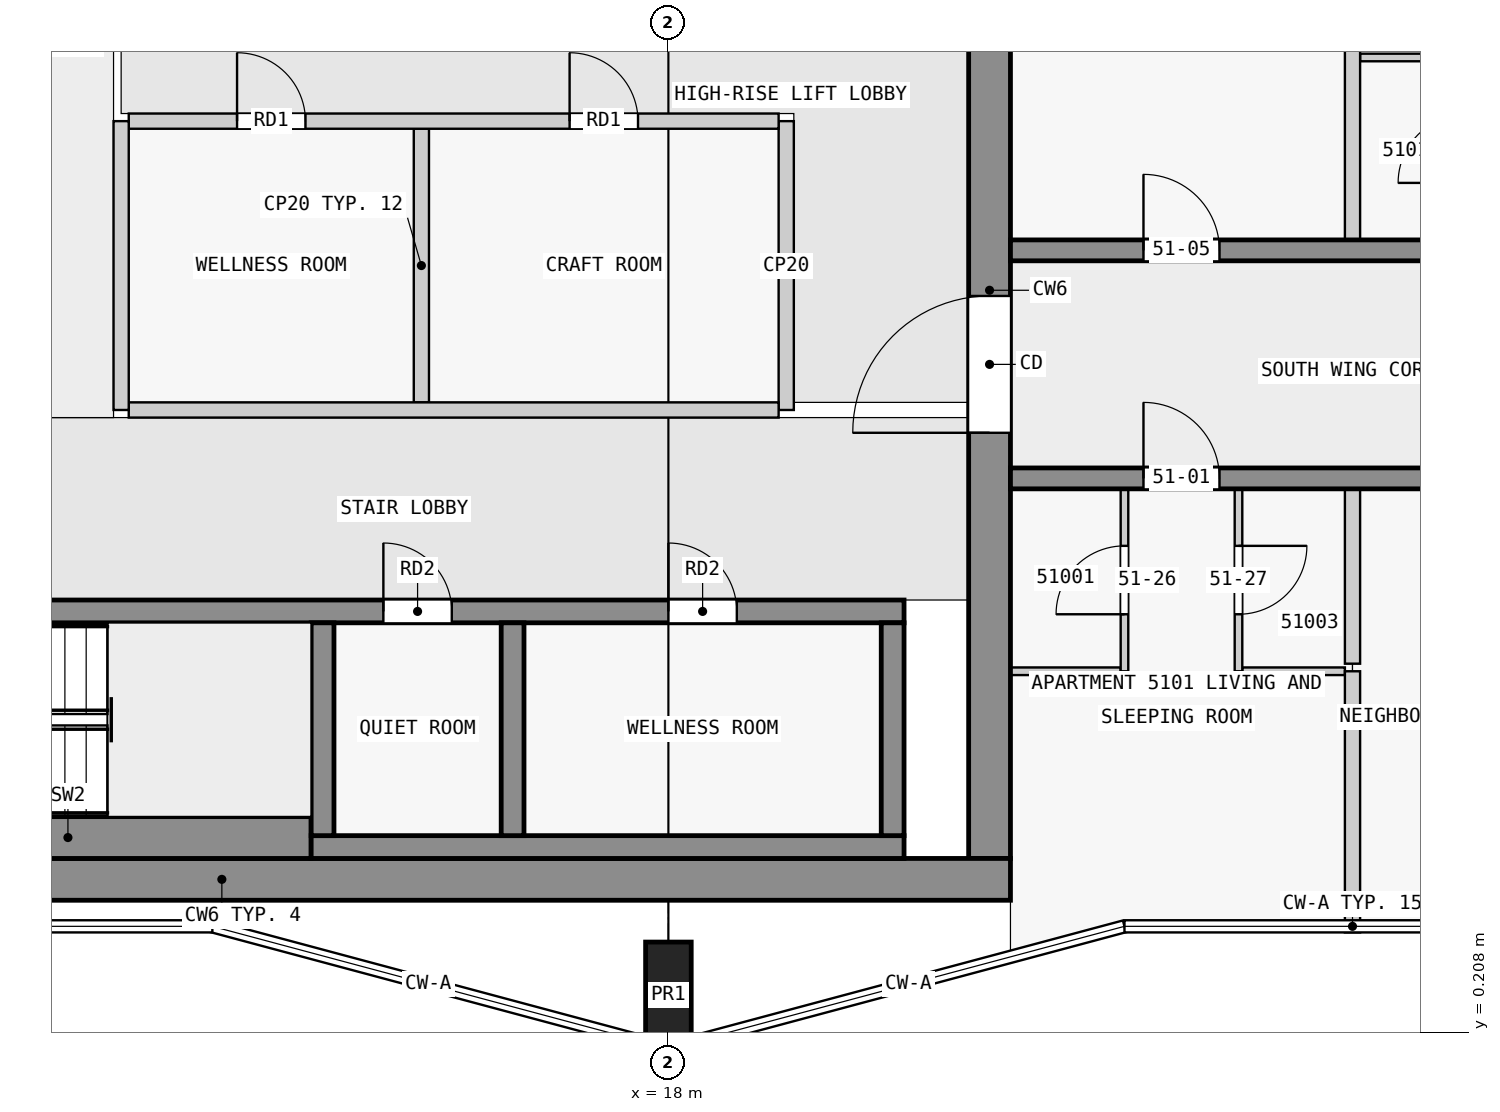
"""IFC4 building model, lengths in metres.
Left out: names, types, materials, properties, quantities, classifications, styles, units other than length and angle.
Written with IfcOpenShell. Run it as: python <this file> out.ifc"""

import sys

from ifc_helpers import new_model, si_unit, direction, frame, frame_2d, origin, origin_2d, place, context, subcontext, project, spatial, rectangle, extrude, element, fill, save


model = new_model("IFC4")
c1 = context("Model", 3, precision=1e-05, world=origin(), true_north=direction((0.0, 1.0)))
c2 = subcontext(c1, "Body", "Model", "MODEL_VIEW")
j1 = project(units=[si_unit("LENGTHUNIT", "METRE"), si_unit("PLANEANGLEUNIT", "RADIAN")], contexts=[c1])
p1 = place(None, origin())
s1 = spatial("IfcSite", under=j1, at=p1, CompositionType="ELEMENT")
p2 = place(p1, origin())
s2 = spatial("IfcBuilding", under=s1, at=p2, CompositionType="ELEMENT")
p3 = place(p2, frame((0.0, 0.0, 197.9)))
s3 = spatial("IfcBuildingStorey", under=s2, at=p3, CompositionType="ELEMENT", Elevation=197.9)
p4 = place(p3, frame((18.0, 0.7, 0.0), z_axis=(0.0, 0.0, 1.0), x_axis=(1.0, 0.0, 0.0)))
e1 = element("IfcColumn", 1, at=p4, inside=s3, PredefinedType="COLUMN", context=c2, shape_type="SweptSolid", body=[
    extrude(rectangle(XDim=0.6, YDim=1.4, at=origin_2d()), origin(), (0.0, 0.0, 1.0), 3.5),
])
p5 = place(p3, frame((1.75, 2.225, 0.0), z_axis=(0.0, 0.0, 1.0), x_axis=(1.0, 0.0, 0.0)))
e2 = element("IfcWall", 2, at=p5, inside=s3, PredefinedType="SHEAR", context=c2, shape_type="SweptSolid", body=[
    extrude(rectangle(XDim=20.75, YDim=0.55, at=frame_2d((10.375, 0.0))), origin(), (0.0, 0.0, 1.0), 3.25),
])
p6 = place(p3, frame((22.225, 2.5, 0.0), z_axis=(0.0, 0.0, 1.0), x_axis=(0.0, 1.0, 0.0)))
e3 = element("IfcWall", 3, at=p6, inside=s3, PredefinedType="SHEAR", context=c2, shape_type="SweptSolid", body=[
    extrude(rectangle(XDim=14.95, YDim=0.55, at=frame_2d((7.475, 0.0))), origin(), (0.0, 0.0, 1.0), 3.25),
])
p7 = place(p6, frame((5.6, 0.0, 0.0)))
e4 = element("IfcOpeningElement", 4, at=p7, cuts=e3, PredefinedType="OPENING", context=c2, shape_type="SweptSolid", body=[
    extrude(rectangle(XDim=1.8, YDim=2.1, at=frame_2d((0.9, 1.05))), frame((0.0, 0.285, 0.0), z_axis=(0.0, -1.0, 0.0), x_axis=(1.0, 0.0, 0.0)), (0.0, 0.0, 1.0), 0.57),
])
p8 = place(p3, frame((6.9, 2.775, 0.0), z_axis=(0.0, 0.0, 1.0), x_axis=(1.0, 0.0, 0.0)))
e5 = element("IfcWall", 5, at=p8, inside=s3, PredefinedType="SHEAR", context=c2, shape_type="SweptSolid", body=[
    extrude(rectangle(XDim=6.4, YDim=0.55, at=frame_2d((3.2, 0.0))), origin(), (0.0, 0.0, 1.0), 3.25),
])
p9 = place(p3, frame((13.3, 2.65, 0.0), z_axis=(0.0, 0.0, 1.0), x_axis=(1.0, 0.0, 0.0)))
e6 = element("IfcWall", 6, at=p9, inside=s3, PredefinedType="SHEAR", context=c2, shape_type="SweptSolid", body=[
    extrude(rectangle(XDim=7.8, YDim=0.3, at=frame_2d((3.9, 0.0))), origin(), (0.0, 0.0, 1.0), 3.25),
])
for number, where, z_axis, x_axis in (
    (7, (13.45, 2.8, 0.0), (0.0, 0.0, 1.0), (0.0, 1.0, 0.0)),
    (8, (15.95, 2.8, 0.0), (0.0, 0.0, 1.0), (0.0, 1.0, 0.0)),
    (9, (20.95, 2.8, 0.0), (0.0, 0.0, 1.0), (0.0, 1.0, 0.0)),
):
    element("IfcWall", number, at=place(p3, frame(where, z_axis=z_axis, x_axis=x_axis)), inside=s3, PredefinedType="SHEAR", context=c2, shape_type="SweptSolid", body=[
        extrude(rectangle(XDim=2.8, YDim=0.3, at=frame_2d((1.4, 0.0))), origin(), (0.0, 0.0, 1.0), 3.25),
    ])
p10 = place(p3, frame((2.3, 5.75, 0.0), z_axis=(0.0, 0.0, 1.0), x_axis=(1.0, 0.0, 0.0)))
e10 = element("IfcWall", 10, at=p10, inside=s3, PredefinedType="SHEAR", context=c2, shape_type="SweptSolid", body=[
    extrude(rectangle(XDim=18.8, YDim=0.3, at=frame_2d((9.4, 0.0))), origin(), (0.0, 0.0, 1.0), 3.25),
])
p11 = place(p10, frame((4.65, 0.0, 0.0)))
e11 = element("IfcOpeningElement", 11, at=p11, cuts=e10, PredefinedType="OPENING", context=c2, shape_type="SweptSolid", body=[
    extrude(rectangle(XDim=1.1, YDim=2.1, at=frame_2d((0.55, 1.05))), frame((0.0, 0.16, 0.0), z_axis=(0.0, -1.0, 0.0), x_axis=(1.0, 0.0, 0.0)), (0.0, 0.0, 1.0), 0.32),
])
p12 = place(p10, frame((0.45, 0.0, 0.0)))
e12 = element("IfcOpeningElement", 12, at=p12, cuts=e10, PredefinedType="OPENING", context=c2, shape_type="SweptSolid", body=[
    extrude(rectangle(XDim=1.1, YDim=2.1, at=frame_2d((0.55, 1.05))), frame((0.0, 0.16, 0.0), z_axis=(0.0, -1.0, 0.0), x_axis=(1.0, 0.0, 0.0)), (0.0, 0.0, 1.0), 0.32),
])
p13 = place(p10, frame((2.75, 0.0, 0.0)))
e13 = element("IfcOpeningElement", 13, at=p13, cuts=e10, PredefinedType="OPENING", context=c2, shape_type="SweptSolid", body=[
    extrude(rectangle(XDim=1.1, YDim=2.1, at=frame_2d((0.55, 1.05))), frame((0.0, 0.16, 0.0), z_axis=(0.0, -1.0, 0.0), x_axis=(1.0, 0.0, 0.0)), (0.0, 0.0, 1.0), 0.32),
])
p14 = place(p10, frame((11.95, 0.0, 0.0)))
e14 = element("IfcOpeningElement", 14, at=p14, cuts=e10, PredefinedType="OPENING", context=c2, shape_type="SweptSolid", body=[
    extrude(rectangle(XDim=0.9, YDim=2.1, at=frame_2d((0.45, 1.05))), frame((0.0, 0.16, 0.0), z_axis=(0.0, -1.0, 0.0), x_axis=(1.0, 0.0, 0.0)), (0.0, 0.0, 1.0), 0.32),
])
p15 = place(p10, frame((15.7, 0.0, 0.0)))
e15 = element("IfcOpeningElement", 15, at=p15, cuts=e10, PredefinedType="OPENING", context=c2, shape_type="SweptSolid", body=[
    extrude(rectangle(XDim=0.9, YDim=2.1, at=frame_2d((0.45, 1.05))), frame((0.0, 0.16, 0.0), z_axis=(0.0, -1.0, 0.0), x_axis=(1.0, 0.0, 0.0)), (0.0, 0.0, 1.0), 0.32),
])
p16 = place(p3, frame((22.5, 7.5, 0.0), z_axis=(0.0, 0.0, 1.0), x_axis=(1.0, 0.0, 0.0)))
e16 = element("IfcWall", 16, at=p16, inside=s3, PredefinedType="SHEAR", context=c2, shape_type="SweptSolid", body=[
    extrude(rectangle(XDim=22.5, YDim=0.275, at=frame_2d((11.25, 0.0))), origin(), (0.0, 0.0, 1.0), 3.25),
])
p17 = place(p16, frame((1.75, 0.0, 0.0)))
e17 = element("IfcOpeningElement", 17, at=p17, cuts=e16, PredefinedType="OPENING", context=c2, shape_type="SweptSolid", body=[
    extrude(rectangle(XDim=1.0, YDim=2.1, at=frame_2d((0.5, 1.05))), frame((0.0, 0.147, 0.0), z_axis=(0.0, -1.0, 0.0), x_axis=(1.0, 0.0, 0.0)), (0.0, 0.0, 1.0), 0.295),
])
p18 = place(p16, frame((5.85, 0.0, 0.0)))
e18 = element("IfcOpeningElement", 18, at=p18, cuts=e16, PredefinedType="OPENING", context=c2, shape_type="SweptSolid", body=[
    extrude(rectangle(XDim=1.8, YDim=2.1, at=frame_2d((0.9, 1.05))), frame((0.0, 0.147, 0.0), z_axis=(0.0, -1.0, 0.0), x_axis=(1.0, 0.0, 0.0)), (0.0, 0.0, 1.0), 0.295),
])
p19 = place(p16, frame((10.75, 0.0, 0.0)))
e19 = element("IfcOpeningElement", 19, at=p19, cuts=e16, PredefinedType="OPENING", context=c2, shape_type="SweptSolid", body=[
    extrude(rectangle(XDim=1.0, YDim=2.1, at=frame_2d((0.5, 1.05))), frame((0.0, 0.147, 0.0), z_axis=(0.0, -1.0, 0.0), x_axis=(1.0, 0.0, 0.0)), (0.0, 0.0, 1.0), 0.295),
])
p20 = place(p16, frame((16.85, 0.0, 0.0)))
e20 = element("IfcOpeningElement", 20, at=p20, cuts=e16, PredefinedType="OPENING", context=c2, shape_type="SweptSolid", body=[
    extrude(rectangle(XDim=1.0, YDim=2.1, at=frame_2d((0.5, 1.05))), frame((0.0, 0.147, 0.0), z_axis=(0.0, -1.0, 0.0), x_axis=(1.0, 0.0, 0.0)), (0.0, 0.0, 1.0), 0.295),
])
p21 = place(p3, frame((22.5, 10.5, 0.0), z_axis=(0.0, 0.0, 1.0), x_axis=(1.0, 0.0, 0.0)))
e21 = element("IfcWall", 21, at=p21, inside=s3, PredefinedType="SHEAR", context=c2, shape_type="SweptSolid", body=[
    extrude(rectangle(XDim=22.5, YDim=0.275, at=frame_2d((11.25, 0.0))), origin(), (0.0, 0.0, 1.0), 3.25),
])
p22 = place(p21, frame((1.75, 0.0, 0.0)))
e22 = element("IfcOpeningElement", 22, at=p22, cuts=e21, PredefinedType="OPENING", context=c2, shape_type="SweptSolid", body=[
    extrude(rectangle(XDim=1.0, YDim=2.1, at=frame_2d((0.5, 1.05))), frame((0.0, 0.147, 0.0), z_axis=(0.0, -1.0, 0.0), x_axis=(1.0, 0.0, 0.0)), (0.0, 0.0, 1.0), 0.295),
])
p23 = place(p21, frame((6.25, 0.0, 0.0)))
e23 = element("IfcOpeningElement", 23, at=p23, cuts=e21, PredefinedType="OPENING", context=c2, shape_type="SweptSolid", body=[
    extrude(rectangle(XDim=1.0, YDim=2.1, at=frame_2d((0.5, 1.05))), frame((0.0, 0.147, 0.0), z_axis=(0.0, -1.0, 0.0), x_axis=(1.0, 0.0, 0.0)), (0.0, 0.0, 1.0), 0.295),
])
p24 = place(p21, frame((10.75, 0.0, 0.0)))
e24 = element("IfcOpeningElement", 24, at=p24, cuts=e21, PredefinedType="OPENING", context=c2, shape_type="SweptSolid", body=[
    extrude(rectangle(XDim=1.0, YDim=2.1, at=frame_2d((0.5, 1.05))), frame((0.0, 0.147, 0.0), z_axis=(0.0, -1.0, 0.0), x_axis=(1.0, 0.0, 0.0)), (0.0, 0.0, 1.0), 0.295),
])
p25 = place(p21, frame((15.25, 0.0, 0.0)))
e25 = element("IfcOpeningElement", 25, at=p25, cuts=e21, PredefinedType="OPENING", context=c2, shape_type="SweptSolid", body=[
    extrude(rectangle(XDim=1.0, YDim=2.1, at=frame_2d((0.5, 1.05))), frame((0.0, 0.147, 0.0), z_axis=(0.0, -1.0, 0.0), x_axis=(1.0, 0.0, 0.0)), (0.0, 0.0, 1.0), 0.295),
])
p26 = place(p21, frame((18.75, 0.0, 0.0)))
e26 = element("IfcOpeningElement", 26, at=p26, cuts=e21, PredefinedType="OPENING", context=c2, shape_type="SweptSolid", body=[
    extrude(rectangle(XDim=0.9, YDim=2.1, at=frame_2d((0.45, 1.05))), frame((0.0, 0.147, 0.0), z_axis=(0.0, -1.0, 0.0), x_axis=(1.0, 0.0, 0.0)), (0.0, 0.0, 1.0), 0.295),
])
p27 = place(p21, frame((20.95, 0.0, 0.0)))
e27 = element("IfcOpeningElement", 27, at=p27, cuts=e21, PredefinedType="OPENING", context=c2, shape_type="SweptSolid", body=[
    extrude(rectangle(XDim=1.0, YDim=2.1, at=frame_2d((0.5, 1.05))), frame((0.0, 0.147, 0.0), z_axis=(0.0, -1.0, 0.0), x_axis=(1.0, 0.0, 0.0)), (0.0, 0.0, 1.0), 0.295),
])
p28 = place(p3, frame((10.8, 8.4, 0.0), z_axis=(0.0, 0.0, 1.0), x_axis=(0.0, 1.0, 0.0)))
e28 = element("IfcWall", 28, at=p28, inside=s3, PredefinedType="PARTITIONING", context=c2, shape_type="SweptSolid", body=[
    extrude(rectangle(XDim=3.8, YDim=0.2, at=frame_2d((1.9, 0.0))), origin(), (0.0, 0.0, 1.0), 3.25),
])
p29 = place(p3, frame((10.9, 8.4, 0.0), z_axis=(0.0, 0.0, 1.0), x_axis=(1.0, 0.0, 0.0)))
e29 = element("IfcWall", 29, at=p29, inside=s3, PredefinedType="PARTITIONING", context=c2, shape_type="SweptSolid", body=[
    extrude(rectangle(XDim=8.55, YDim=0.2, at=frame_2d((4.275, 0.0))), origin(), (0.0, 0.0, 1.0), 3.25),
])
p30 = place(p3, frame((19.55, 8.4, 0.0), z_axis=(0.0, 0.0, 1.0), x_axis=(0.0, 1.0, 0.0)))
e30 = element("IfcWall", 30, at=p30, inside=s3, PredefinedType="PARTITIONING", context=c2, shape_type="SweptSolid", body=[
    extrude(rectangle(XDim=3.8, YDim=0.2, at=frame_2d((1.9, 0.0))), origin(), (0.0, 0.0, 1.0), 3.25),
])
p31 = place(p3, frame((10.9, 12.2, 0.0), z_axis=(0.0, 0.0, 1.0), x_axis=(1.0, 0.0, 0.0)))
e31 = element("IfcWall", 31, at=p31, inside=s3, PredefinedType="PARTITIONING", context=c2, shape_type="SweptSolid", body=[
    extrude(rectangle(XDim=8.55, YDim=0.2, at=frame_2d((4.275, 0.0))), origin(), (0.0, 0.0, 1.0), 3.25),
])
p32 = place(p31, frame((1.425, 0.0, 0.0)))
e32 = element("IfcOpeningElement", 32, at=p32, cuts=e31, PredefinedType="OPENING", context=c2, shape_type="SweptSolid", body=[
    extrude(rectangle(XDim=0.9, YDim=2.1, at=frame_2d((0.45, 1.05))), frame((0.0, 0.11, 0.0), z_axis=(0.0, -1.0, 0.0), x_axis=(1.0, 0.0, 0.0)), (0.0, 0.0, 1.0), 0.22),
])
p33 = place(p31, frame((5.8, 0.0, 0.0)))
e33 = element("IfcOpeningElement", 33, at=p33, cuts=e31, PredefinedType="OPENING", context=c2, shape_type="SweptSolid", body=[
    extrude(rectangle(XDim=0.9, YDim=2.1, at=frame_2d((0.45, 1.05))), frame((0.0, 0.11, 0.0), z_axis=(0.0, -1.0, 0.0), x_axis=(1.0, 0.0, 0.0)), (0.0, 0.0, 1.0), 0.22),
])
p34 = place(p3, frame((14.75, 8.5, 0.0), z_axis=(0.0, 0.0, 1.0), x_axis=(0.0, 1.0, 0.0)))
e34 = element("IfcWall", 34, at=p34, inside=s3, PredefinedType="PARTITIONING", context=c2, shape_type="SweptSolid", body=[
    extrude(rectangle(XDim=3.6, YDim=0.2, at=frame_2d((1.8, 0.0))), origin(), (0.0, 0.0, 1.0), 3.25),
])
p35 = place(p3, frame((22.5, 4.962, 0.0), z_axis=(0.0, 0.0, 1.0), x_axis=(1.0, 0.0, 0.0)))
e35 = element("IfcWall", 35, at=p35, inside=s3, PredefinedType="PARTITIONING", context=c2, shape_type="SweptSolid", body=[
    extrude(rectangle(XDim=1.45, YDim=0.1, at=frame_2d((0.725, 0.0))), origin(), (0.0, 0.0, 1.0), 3.25),
])
for number, where, z_axis, x_axis in (
    (36, (25.55, 4.962, 0.0), (0.0, 0.0, 1.0), (1.0, 0.0, 0.0)),
    (37, (28.45, 13.038, 0.0), (0.0, 0.0, 1.0), (-1.0, 0.0, 0.0)),
):
    element("IfcWall", number, at=place(p3, frame(where, z_axis=z_axis, x_axis=x_axis)), inside=s3, PredefinedType="PARTITIONING", context=c2, shape_type="SweptSolid", body=[
        extrude(rectangle(XDim=1.35, YDim=0.1, at=frame_2d((0.675, 0.0))), origin(), (0.0, 0.0, 1.0), 3.25),
    ])
p36 = place(p3, frame((24.0, 4.962, 0.0), z_axis=(0.0, 0.0, 1.0), x_axis=(0.0, 1.0, 0.0)))
e38 = element("IfcWall", 38, at=p36, inside=s3, PredefinedType="PARTITIONING", context=c2, shape_type="SweptSolid", body=[
    extrude(rectangle(XDim=2.4, YDim=0.1, at=frame_2d((1.2, 0.0))), origin(), (0.0, 0.0, 1.0), 3.25),
])
p37 = place(p36, frame((0.75, 0.0, 0.0)))
e39 = element("IfcOpeningElement", 39, at=p37, cuts=e38, PredefinedType="OPENING", context=c2, shape_type="SweptSolid", body=[
    extrude(rectangle(XDim=0.9, YDim=2.1, at=frame_2d((0.45, 1.05))), frame((0.0, 0.06, 0.0), z_axis=(0.0, -1.0, 0.0), x_axis=(1.0, 0.0, 0.0)), (0.0, 0.0, 1.0), 0.12),
])
p38 = place(p3, frame((25.5, 7.363, 0.0), z_axis=(0.0, 0.0, 1.0), x_axis=(0.0, -1.0, 0.0)))
e40 = element("IfcWall", 40, at=p38, inside=s3, PredefinedType="PARTITIONING", context=c2, shape_type="SweptSolid", body=[
    extrude(rectangle(XDim=2.4, YDim=0.1, at=frame_2d((1.2, 0.0))), origin(), (0.0, 0.0, 1.0), 3.25),
])
p39 = place(p38, frame((0.75, 0.0, 0.0)))
e41 = element("IfcOpeningElement", 41, at=p39, cuts=e40, PredefinedType="OPENING", context=c2, shape_type="SweptSolid", body=[
    extrude(rectangle(XDim=0.9, YDim=2.1, at=frame_2d((0.45, 1.05))), frame((0.0, 0.06, 0.0), z_axis=(0.0, -1.0, 0.0), x_axis=(1.0, 0.0, 0.0)), (0.0, 0.0, 1.0), 0.12),
])
p40 = place(p3, frame((27.0, 4.962, 0.0), z_axis=(0.0, 0.0, 1.0), x_axis=(0.0, -1.0, 0.0)))
e42 = element("IfcWall", 42, at=p40, inside=s3, PredefinedType="PARTITIONING", context=c2, shape_type="SweptSolid", body=[
    extrude(rectangle(XDim=3.436, YDim=0.2, at=frame_2d((1.718, 0.0))), origin(), (0.0, 0.0, 1.0), 3.25),
])
p41 = place(p3, frame((27.0, 5.062, 0.0), z_axis=(0.0, 0.0, 1.0), x_axis=(0.0, 1.0, 0.0)))
e43 = element("IfcWall", 43, at=p41, inside=s3, PredefinedType="PARTITIONING", context=c2, shape_type="SweptSolid", body=[
    extrude(rectangle(XDim=2.3, YDim=0.2, at=frame_2d((1.15, 0.0))), origin(), (0.0, 0.0, 1.0), 3.25),
])
p42 = place(p3, frame((27.0, 10.637, 0.0), z_axis=(0.0, 0.0, 1.0), x_axis=(0.0, 1.0, 0.0)))
e44 = element("IfcWall", 44, at=p42, inside=s3, PredefinedType="PARTITIONING", context=c2, shape_type="SweptSolid", body=[
    extrude(rectangle(XDim=5.836, YDim=0.2, at=frame_2d((2.918, 0.0))), origin(), (0.0, 0.0, 1.0), 3.25),
])
p43 = place(p32, origin())
e45 = element("IfcDoor", 45, at=p43, inside=s3, OperationType="SINGLE_SWING_LEFT", PredefinedType="DOOR", context=c2, shape_type="SweptSolid", body=[
    extrude(rectangle(XDim=0.9, YDim=2.1, at=frame_2d((0.45, 1.05))), frame((0.0, 0.025, 0.0), z_axis=(0.0, -1.0, 0.0), x_axis=(1.0, 0.0, 0.0)), (0.0, 0.0, 1.0), 0.05),
])
fill(e32, e45)
p44 = place(p33, origin())
e46 = element("IfcDoor", 46, at=p44, inside=s3, OperationType="SINGLE_SWING_LEFT", PredefinedType="DOOR", context=c2, shape_type="SweptSolid", body=[
    extrude(rectangle(XDim=0.9, YDim=2.1, at=frame_2d((0.45, 1.05))), frame((0.0, 0.025, 0.0), z_axis=(0.0, -1.0, 0.0), x_axis=(1.0, 0.0, 0.0)), (0.0, 0.0, 1.0), 0.05),
])
fill(e33, e46)
p45 = place(p7, origin())
e47 = element("IfcDoor", 47, at=p45, inside=s3, OperationType="DOUBLE_DOOR_SINGLE_SWING", PredefinedType="DOOR", context=c2, shape_type="SweptSolid", body=[
    extrude(rectangle(XDim=1.8, YDim=2.1, at=frame_2d((0.9, 1.05))), frame((0.0, 0.025, 0.0), z_axis=(0.0, -1.0, 0.0), x_axis=(1.0, 0.0, 0.0)), (0.0, 0.0, 1.0), 0.05),
])
fill(e4, e47)
p46 = place(p14, origin())
e48 = element("IfcDoor", 48, at=p46, inside=s3, OperationType="SINGLE_SWING_LEFT", PredefinedType="DOOR", context=c2, shape_type="SweptSolid", body=[
    extrude(rectangle(XDim=0.9, YDim=2.1, at=frame_2d((0.45, 1.05))), frame((0.0, 0.025, 0.0), z_axis=(0.0, -1.0, 0.0), x_axis=(1.0, 0.0, 0.0)), (0.0, 0.0, 1.0), 0.05),
])
fill(e14, e48)
p47 = place(p15, origin())
e49 = element("IfcDoor", 49, at=p47, inside=s3, OperationType="SINGLE_SWING_LEFT", PredefinedType="DOOR", context=c2, shape_type="SweptSolid", body=[
    extrude(rectangle(XDim=0.9, YDim=2.1, at=frame_2d((0.45, 1.05))), frame((0.0, 0.025, 0.0), z_axis=(0.0, -1.0, 0.0), x_axis=(1.0, 0.0, 0.0)), (0.0, 0.0, 1.0), 0.05),
])
fill(e15, e49)
p48 = place(p17, origin())
e50 = element("IfcDoor", 50, at=p48, inside=s3, OperationType="SINGLE_SWING_LEFT", PredefinedType="DOOR", context=c2, shape_type="SweptSolid", body=[
    extrude(rectangle(XDim=1.0, YDim=2.1, at=frame_2d((0.5, 1.05))), frame((0.0, 0.025, 0.0), z_axis=(0.0, -1.0, 0.0), x_axis=(1.0, 0.0, 0.0)), (0.0, 0.0, 1.0), 0.05),
])
fill(e17, e50)
p49 = place(p22, origin())
e51 = element("IfcDoor", 51, at=p49, inside=s3, OperationType="SINGLE_SWING_LEFT", PredefinedType="DOOR", context=c2, shape_type="SweptSolid", body=[
    extrude(rectangle(XDim=1.0, YDim=2.1, at=frame_2d((0.5, 1.05))), frame((0.0, 0.025, 0.0), z_axis=(0.0, -1.0, 0.0), x_axis=(1.0, 0.0, 0.0)), (0.0, 0.0, 1.0), 0.05),
])
fill(e22, e51)
p50 = place(p37, origin())
e52 = element("IfcDoor", 52, at=p50, inside=s3, OperationType="SINGLE_SWING_RIGHT", PredefinedType="DOOR", context=c2, shape_type="SweptSolid", body=[
    extrude(rectangle(XDim=0.9, YDim=2.1, at=frame_2d((0.45, 1.05))), frame((0.0, 0.025, 0.0), z_axis=(0.0, -1.0, 0.0), x_axis=(1.0, 0.0, 0.0)), (0.0, 0.0, 1.0), 0.05),
])
fill(e39, e52)
p51 = place(p39, origin())
e53 = element("IfcDoor", 53, at=p51, inside=s3, OperationType="SINGLE_SWING_RIGHT", PredefinedType="DOOR", context=c2, shape_type="SweptSolid", body=[
    extrude(rectangle(XDim=0.9, YDim=2.1, at=frame_2d((0.45, 1.05))), frame((0.0, 0.025, 0.0), z_axis=(0.0, -1.0, 0.0), x_axis=(1.0, 0.0, 0.0)), (0.0, 0.0, 1.0), 0.05),
])
fill(e41, e53)
save(model, sys.argv[1])
